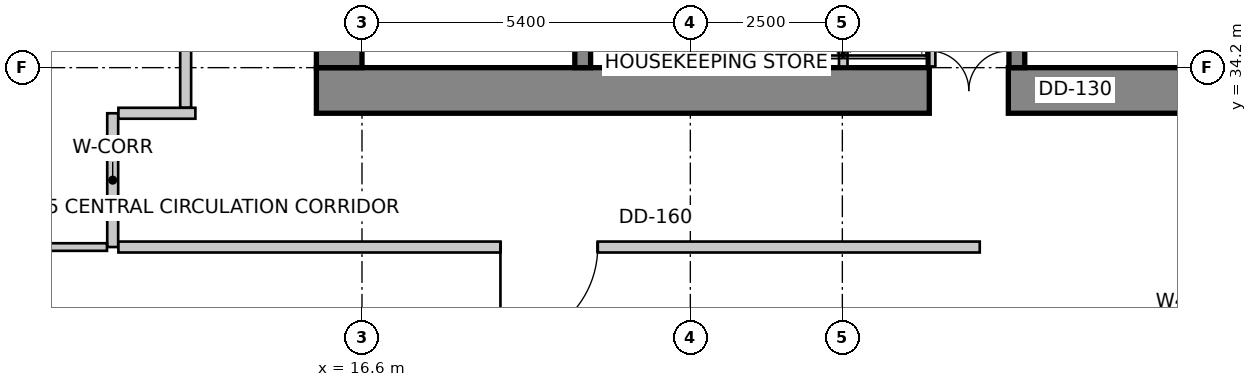
"""IFC4 building model, lengths in metres.
Left out: names, types, materials, properties, quantities, classifications, styles, units other than length and angle.
Written with IfcOpenShell. Run it as: python <this file> out.ifc"""

import sys

from ifc_helpers import new_model, si_unit, direction, frame, frame_2d, origin, place, context, subcontext, project, spatial, rectangle, extrude, source, transform, mapped, element, fill, save


model = new_model("IFC4")
c1 = context("Model", 3, precision=1e-05, world=origin(), true_north=direction((0.0, 1.0)))
c2 = subcontext(c1, "Body", "Model", "MODEL_VIEW")
j1 = project(units=[si_unit("LENGTHUNIT", "METRE"), si_unit("PLANEANGLEUNIT", "RADIAN")], contexts=[c1])
p1 = place(None, origin())
s1 = spatial("IfcSite", under=j1, at=p1, CompositionType="ELEMENT")
p2 = place(p1, origin())
s2 = spatial("IfcBuilding", under=s1, at=p2, CompositionType="ELEMENT")
p3 = place(p2, frame((0.0, 0.0, 105.4)))
s3 = spatial("IfcBuildingStorey", under=s2, at=p3, CompositionType="ELEMENT", Elevation=105.4)
p4 = place(p3, frame((15.85, 33.825, 0.0), z_axis=(0.0, 0.0, 1.0), x_axis=(1.0, 0.0, 0.0)))
e1 = element("IfcWall", 1, at=p4, inside=s3, PredefinedType="SHEAR", context=c2, shape_type="SweptSolid", body=[
    extrude(rectangle(XDim=15.9, YDim=0.75, at=frame_2d((7.95, 0.0))), origin(), (0.0, 0.0, 1.0), 5.2),
])
m1 = source(origin(), c2, "Body", "SweptSolid", [
    extrude(rectangle(XDim=1.3, YDim=2.15, at=frame_2d((0.65, 1.075))), frame((0.0, 0.385, 0.0), z_axis=(0.0, -1.0, 0.0), x_axis=(1.0, 0.0, 0.0)), (0.0, 0.0, 1.0), 0.77),
])
p5 = place(p4, frame((10.08, 0.0, 0.0)))
e2 = element("IfcOpeningElement", 2, at=p5, cuts=e1, PredefinedType="OPENING", context=c2, shape_type="MappedRepresentation", body=[
    mapped(m1, transform((0.0, 0.0, 0.0), scale=1.0)),
])
p6 = place(p3, frame((16.225, 34.2, 0.0), z_axis=(0.0, 0.0, 1.0), x_axis=(0.0, 1.0, 0.0)))
e3 = element("IfcWall", 3, at=p6, inside=s3, PredefinedType="SHEAR", context=c2, shape_type="SweptSolid", body=[
    extrude(rectangle(XDim=11.4, YDim=0.75, at=frame_2d((5.7, 0.0))), origin(), (0.0, 0.0, 1.0), 5.2),
])
m2 = source(origin(), c2, "Body", "SweptSolid", [
    extrude(rectangle(XDim=1.1, YDim=2.15, at=frame_2d((0.55, 1.075))), frame((0.0, 0.385, 0.0), z_axis=(0.0, -1.0, 0.0), x_axis=(1.0, 0.0, 0.0)), (0.0, 0.0, 1.0), 0.77),
])
p7 = place(p6, frame((7.15, 0.0, 0.0)))
e4 = element("IfcOpeningElement", 4, at=p7, cuts=e3, PredefinedType="OPENING", context=c2, shape_type="MappedRepresentation", body=[
    mapped(m2, transform((0.0, 0.0, 0.0), scale=1.0)),
])
p8 = place(p3, frame((20.23, 34.2, 0.0), z_axis=(0.0, 0.0, 1.0), x_axis=(0.0, 1.0, 0.0)))
e5 = element("IfcWall", 5, at=p8, inside=s3, PredefinedType="SHEAR", context=c2, shape_type="SweptSolid", body=[
    extrude(rectangle(XDim=9.06, YDim=0.26, at=frame_2d((4.53, 0.0))), origin(), (0.0, 0.0, 1.0), 5.2),
])
m3 = source(origin(), c2, "Body", "SweptSolid", [
    extrude(rectangle(XDim=1.1, YDim=2.15, at=frame_2d((0.55, 1.075))), frame((0.0, 0.14, 0.0), z_axis=(0.0, -1.0, 0.0), x_axis=(1.0, 0.0, 0.0)), (0.0, 0.0, 1.0), 0.28),
])
p9 = place(p8, frame((7.45, 0.0, 0.0)))
e6 = element("IfcOpeningElement", 6, at=p9, cuts=e5, PredefinedType="OPENING", context=c2, shape_type="MappedRepresentation", body=[
    mapped(m3, transform((0.0, 0.0, 0.0), scale=1.0)),
])
p10 = place(p3, frame((27.37, 34.2, 0.0), z_axis=(0.0, 0.0, 1.0), x_axis=(0.0, 1.0, 0.0)))
e7 = element("IfcWall", 7, at=p10, inside=s3, PredefinedType="SHEAR", context=c2, shape_type="SweptSolid", body=[
    extrude(rectangle(XDim=9.06, YDim=0.26, at=frame_2d((4.53, 0.0))), origin(), (0.0, 0.0, 1.0), 5.2),
])
p11 = place(p10, frame((7.45, 0.0, 0.0)))
e8 = element("IfcOpeningElement", 8, at=p11, cuts=e7, PredefinedType="OPENING", context=c2, shape_type="MappedRepresentation", body=[
    mapped(m3, transform((0.0, 0.0, 0.0), scale=1.0)),
])
p12 = place(p3, frame((28.884, 28.792, 0.0), z_axis=(0.0, 0.0, 1.0), x_axis=(0.707064797706, 0.707148762175, 0.0)))
e9 = element("IfcWall", 9, at=p12, inside=s3, PredefinedType="SOLIDWALL", context=c2, shape_type="SweptSolid", body=[
    extrude(rectangle(XDim=2.908, YDim=0.3, at=frame_2d((1.454, 0.0))), origin(), (0.0, 0.0, 1.0), 4.95),
])
m4 = source(origin(), c2, "Body", "SweptSolid", [
    extrude(rectangle(XDim=2.1, YDim=2.0, at=frame_2d((1.05, 1.0))), frame((0.0, 0.16, 0.0), z_axis=(0.0, -1.0, 0.0), x_axis=(1.0, 0.0, 0.0)), (0.0, 0.0, 1.0), 0.32),
])
p13 = place(p12, frame((0.404, 0.0, 0.85)))
e10 = element("IfcOpeningElement", 10, at=p13, cuts=e9, PredefinedType="OPENING", context=c2, shape_type="MappedRepresentation", body=[
    mapped(m4, transform((0.0, 0.0, 0.0), scale=1.0)),
])
p14 = place(p3, frame((13.269, 47.134, 0.0), z_axis=(0.0, 0.0, 1.0), x_axis=(-0.319929596295, -0.947441319246, 0.0)))
e11 = element("IfcWall", 11, at=p14, inside=s3, PredefinedType="SOLIDWALL", context=c2, shape_type="SweptSolid", body=[
    extrude(rectangle(XDim=16.134, YDim=0.3, at=frame_2d((8.067, 0.0))), origin(), (0.0, 0.0, 1.0), 4.95),
])
m5 = source(origin(), c2, "Body", "SweptSolid", [
    extrude(rectangle(XDim=2.4, YDim=2.2, at=frame_2d((1.2, 1.1))), frame((0.0, 0.16, 0.0), z_axis=(0.0, -1.0, 0.0), x_axis=(1.0, 0.0, 0.0)), (0.0, 0.0, 1.0), 0.32),
])
p15 = place(p14, frame((2.276, 0.0, 0.85)))
e12 = element("IfcOpeningElement", 12, at=p15, cuts=e11, PredefinedType="OPENING", context=c2, shape_type="MappedRepresentation", body=[
    mapped(m5, transform((0.0, 0.0, 0.0), scale=1.0)),
])
m6 = source(origin(), c2, "Body", "SweptSolid", [
    extrude(rectangle(XDim=2.8, YDim=2.4, at=frame_2d((1.4, 1.2))), frame((0.0, 0.16, 0.0), z_axis=(0.0, -1.0, 0.0), x_axis=(1.0, 0.0, 0.0)), (0.0, 0.0, 1.0), 0.32),
])
p16 = place(p14, frame((7.011, 0.0, 0.85)))
e13 = element("IfcOpeningElement", 13, at=p16, cuts=e11, PredefinedType="OPENING", context=c2, shape_type="MappedRepresentation", body=[
    mapped(m6, transform((0.0, 0.0, 0.0), scale=1.0)),
])
p17 = place(p14, frame((12.147, 0.0, 0.85)))
e14 = element("IfcOpeningElement", 14, at=p17, cuts=e11, PredefinedType="OPENING", context=c2, shape_type="MappedRepresentation", body=[
    mapped(m5, transform((0.0, 0.0, 0.0), scale=1.0)),
])
p18 = place(p3, frame((8.185, 31.834, 0.0), z_axis=(0.0, 0.0, 1.0), x_axis=(0.189707113148, -0.981840725994, 0.0)))
e15 = element("IfcWall", 15, at=p18, inside=s3, PredefinedType="SOLIDWALL", context=c2, shape_type="SweptSolid", body=[
    extrude(rectangle(XDim=21.221, YDim=0.3, at=frame_2d((10.611, 0.0))), origin(), (0.0, 0.0, 1.0), 4.95),
])
p19 = place(p18, frame((2.145, 0.0, 0.85)))
e16 = element("IfcOpeningElement", 16, at=p19, cuts=e15, PredefinedType="OPENING", context=c2, shape_type="MappedRepresentation", body=[
    mapped(m6, transform((0.0, 0.0, 0.0), scale=1.0)),
])
p20 = place(p18, frame((7.761, 0.0, 0.85)))
e17 = element("IfcOpeningElement", 17, at=p20, cuts=e15, PredefinedType="OPENING", context=c2, shape_type="MappedRepresentation", body=[
    mapped(m5, transform((0.0, 0.0, 0.0), scale=1.0)),
])
p21 = place(p18, frame((12.977, 0.0, 0.85)))
e18 = element("IfcOpeningElement", 18, at=p21, cuts=e15, PredefinedType="OPENING", context=c2, shape_type="MappedRepresentation", body=[
    mapped(m6, transform((0.0, 0.0, 0.0), scale=1.0)),
])
p22 = place(p18, frame((17.813, 0.0, 0.85)))
e19 = element("IfcOpeningElement", 19, at=p22, cuts=e15, PredefinedType="OPENING", context=c2, shape_type="MappedRepresentation", body=[
    mapped(m6, transform((0.0, 0.0, 0.0), scale=1.0)),
])
for number, where, z_axis, x_axis in (
    (20, (25.96, 34.22, 0.0), (0.0, 0.0, 1.0), (0.0, 1.0, 0.0)),
    (21, (23.07, 34.22, 0.0), (0.0, 0.0, 1.0), (0.0, 1.0, 0.0)),
    (22, (24.515, 34.22, 0.0), (0.0, 0.0, 1.0), (0.0, 1.0, 0.0)),
):
    element("IfcWall", number, at=place(p3, frame(where, z_axis=z_axis, x_axis=x_axis)), inside=s3, PredefinedType="SOLIDWALL", context=c2, shape_type="SweptSolid", body=[
        extrude(rectangle(XDim=1.62, YDim=0.14, at=frame_2d((0.81, 0.0))), origin(), (0.0, 0.0, 1.0), 4.242),
    ])
p23 = place(p3, frame((12.5, 31.25, 0.0), z_axis=(0.0, 0.0, 1.0), x_axis=(0.0, 1.0, 0.0)))
e23 = element("IfcWall", 23, at=p23, inside=s3, PredefinedType="PARTITIONING", context=c2, shape_type="SweptSolid", body=[
    extrude(rectangle(XDim=2.2, YDim=0.18, at=frame_2d((1.1, 0.0))), origin(), (0.0, 0.0, 1.0), 4.619),
])
p24 = place(p3, frame((12.594, 33.45, 0.0), z_axis=(0.0, 0.0, 1.0), x_axis=(1.0, 0.0, 0.0)))
e24 = element("IfcWall", 24, at=p24, inside=s3, PredefinedType="PARTITIONING", context=c2, shape_type="SweptSolid", body=[
    extrude(rectangle(XDim=1.266, YDim=0.18, at=frame_2d((0.633, 0.0))), origin(), (0.0, 0.0, 1.0), 4.95),
])
p25 = place(p3, frame((26.76, 31.25, 0.0), z_axis=(0.0, 0.0, 1.0), x_axis=(-1.0, 0.0, 0.0)))
e25 = element("IfcWall", 25, at=p25, inside=s3, PredefinedType="PARTITIONING", context=c2, shape_type="SweptSolid", body=[
    extrude(rectangle(XDim=14.166, YDim=0.18, at=frame_2d((7.083, 0.0))), origin(), (0.0, 0.0, 1.0), 4.619),
])
m7 = source(origin(), c2, "Body", "SweptSolid", [
    extrude(rectangle(XDim=1.6, YDim=2.15, at=frame_2d((0.8, 1.075))), frame((0.0, 0.1, 0.0), z_axis=(0.0, -1.0, 0.0), x_axis=(1.0, 0.0, 0.0)), (0.0, 0.0, 1.0), 0.2),
])
p26 = place(p25, frame((6.283, 0.0, 0.0)))
e26 = element("IfcOpeningElement", 26, at=p26, cuts=e25, PredefinedType="OPENING", context=c2, shape_type="MappedRepresentation", body=[
    mapped(m7, transform((0.0, 0.0, 0.0), scale=1.0)),
])
p27 = place(p3, frame((13.7, 33.544, 0.0), z_axis=(0.0, 0.0, 1.0), x_axis=(0.0, 1.0, 0.0)))
e27 = element("IfcWall", 27, at=p27, inside=s3, PredefinedType="PARTITIONING", context=c2, shape_type="SweptSolid", body=[
    extrude(rectangle(XDim=13.86, YDim=0.18, at=frame_2d((6.93, 0.0))), origin(), (0.0, 0.0, 1.0), 4.092),
])
m8 = source(origin(), c2, "Body", "SweptSolid", [
    extrude(rectangle(XDim=0.9, YDim=2.15, at=frame_2d((0.45, 1.075))), frame((0.0, 0.1, 0.0), z_axis=(0.0, -1.0, 0.0), x_axis=(1.0, 0.0, 0.0)), (0.0, 0.0, 1.0), 0.2),
])
p28 = place(p27, frame((4.253, 0.0, 0.0)))
e28 = element("IfcOpeningElement", 28, at=p28, cuts=e27, PredefinedType="OPENING", context=c2, shape_type="MappedRepresentation", body=[
    mapped(m8, transform((0.0, 0.0, 0.0), scale=1.0)),
])
p29 = place(p3, frame((12.406, 31.25, 0.0), z_axis=(0.0, 0.0, 1.0), x_axis=(-1.0, 0.0, 0.0)))
e29 = element("IfcWall", 29, at=p29, inside=s3, PredefinedType="PARTITIONING", context=c2, shape_type="SweptSolid", body=[
    extrude(rectangle(XDim=3.991, YDim=0.125, at=frame_2d((1.996, 0.0))), origin(), (0.0, 0.0, 1.0), 4.092),
])
m9 = source(origin(), c2, "Body", "SweptSolid", [
    extrude(rectangle(XDim=2.1, YDim=2.0, at=frame_2d((1.05, 1.0))), frame((0.0, -0.015, 0.0), z_axis=(0.0, -1.0, 0.0), x_axis=(1.0, 0.0, 0.0)), (0.0, 0.0, 1.0), 0.06),
])
p30 = place(p13, origin())
e30 = element("IfcWindow", 30, at=p30, inside=s3, PartitioningType="SINGLE_PANEL", PredefinedType="WINDOW", context=c2, shape_type="MappedRepresentation", body=[
    mapped(m9, transform((0.0, 0.0, 0.0), scale=1.0)),
])
fill(e10, e30)
m10 = source(origin(), c2, "Body", "SweptSolid", [
    extrude(rectangle(XDim=1.3, YDim=2.15, at=frame_2d((0.65, 1.075))), frame((0.0, 0.025, 0.0), z_axis=(0.0, -1.0, 0.0), x_axis=(1.0, 0.0, 0.0)), (0.0, 0.0, 1.0), 0.05),
])
p31 = place(p5, origin())
e31 = element("IfcDoor", 31, at=p31, inside=s3, OperationType="DOUBLE_DOOR_SINGLE_SWING", PredefinedType="DOOR", context=c2, shape_type="MappedRepresentation", body=[
    mapped(m10, transform((0.0, 0.0, 0.0), scale=1.0)),
])
fill(e2, e31)
m11 = source(origin(), c2, "Body", "SweptSolid", [
    extrude(rectangle(XDim=1.6, YDim=2.15, at=frame_2d((0.8, 1.075))), frame((0.0, 0.025, 0.0), z_axis=(0.0, -1.0, 0.0), x_axis=(1.0, 0.0, 0.0)), (0.0, 0.0, 1.0), 0.05),
])
p32 = place(p26, origin())
e32 = element("IfcDoor", 32, at=p32, inside=s3, OperationType="SINGLE_SWING_RIGHT", PredefinedType="DOOR", context=c2, shape_type="MappedRepresentation", body=[
    mapped(m11, transform((0.0, 0.0, 0.0), scale=1.0)),
])
fill(e26, e32)
save(model, sys.argv[1])
